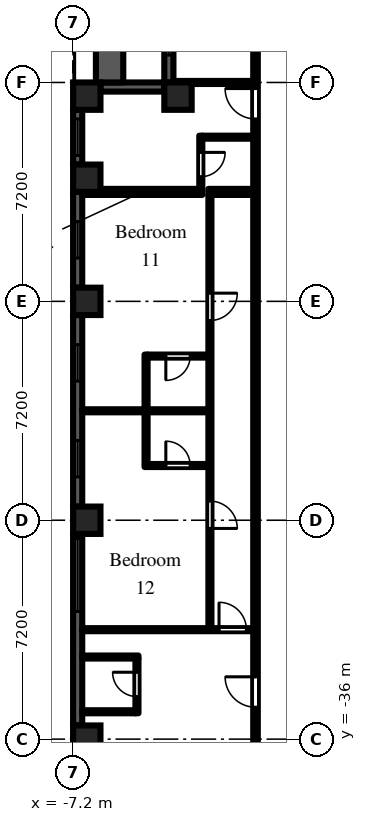
"""IFC4 building model, lengths in metres.
Left out: names, types, materials, properties, quantities, classifications, styles, units other than length and angle.
Written with IfcOpenShell. Run it as: python <this file> out.ifc"""

import sys

from ifc_helpers import new_model, si_unit, direction, frame, frame_2d, origin, origin_2d, place, context, subcontext, project, spatial, rectangle, extrude, element, fill, save


model = new_model("IFC4")
c1 = context("Model", 3, precision=1e-05, world=origin(), true_north=direction((0.0, 1.0)))
c2 = subcontext(c1, "Body", "Model", "MODEL_VIEW")
j1 = project(units=[si_unit("LENGTHUNIT", "METRE"), si_unit("PLANEANGLEUNIT", "RADIAN")], contexts=[c1])
p1 = place(None, origin())
s1 = spatial("IfcSite", under=j1, at=p1, CompositionType="ELEMENT")
p2 = place(p1, origin())
s2 = spatial("IfcBuilding", under=s1, at=p2, CompositionType="ELEMENT")
p3 = place(p2, frame((0.0, 0.0, 29.7)))
s3 = spatial("IfcBuildingStorey", under=s2, at=p3, CompositionType="ELEMENT", Elevation=29.7)
for number, where, z_axis, x_axis in (
    (1, (-6.75, -36.0, 0.0), (0.0, 0.0, 1.0), (1.0, 0.0, 0.0)),
    (2, (-6.75, -28.8, 0.0), (0.0, 0.0, 1.0), (1.0, 0.0, 0.0)),
    (3, (-6.75, -21.6, 0.0), (0.0, 0.0, 1.0), (1.0, 0.0, 0.0)),
    (4, (-6.75, -17.55, 0.0), (0.0, 0.0, 1.0), (1.0, 0.0, 0.0)),
    (5, (-6.75, -14.85, 0.0), (0.0, 0.0, 1.0), (1.0, 0.0, 0.0)),
    (6, (-3.75, -14.85, 0.0), (0.0, 0.0, 1.0), (1.0, 0.0, 0.0)),
):
    element("IfcColumn", number, at=place(p3, frame(where, z_axis=z_axis, x_axis=x_axis)), inside=s3, PredefinedType="COLUMN", context=c2, shape_type="SweptSolid", body=[
        extrude(rectangle(XDim=0.9, YDim=0.9, at=origin_2d()), origin(), (0.0, 0.0, 1.0), 3.0),
    ])
p4 = place(p3, frame((-4.05, -7.2, 0.0), z_axis=(0.0, 0.0, 1.0), x_axis=(0.0, -1.0, 0.0)))
e7 = element("IfcWall", 7, at=p4, inside=s3, PredefinedType="SOLIDWALL", context=c2, shape_type="SweptSolid", body=[
    extrude(rectangle(XDim=7.2, YDim=0.3, at=frame_2d((3.6, 0.0))), origin(), (0.0, 0.0, 1.0), 2.1),
])
p5 = place(p4, frame((3.0, 0.0, 0.0)))
e8 = element("IfcOpeningElement", 8, at=p5, cuts=e7, PredefinedType="OPENING", context=c2, shape_type="SweptSolid", body=[
    extrude(rectangle(XDim=1.2, YDim=2.05, at=frame_2d((0.6, 1.025))), frame((0.0, 0.16, 0.0), z_axis=(0.0, -1.0, 0.0), x_axis=(1.0, 0.0, 0.0)), (0.0, 0.0, 1.0), 0.32),
])
p6 = place(p4, frame((0.9, 0.0, 0.2)))
e9 = element("IfcOpeningElement", 9, at=p6, cuts=e7, PredefinedType="OPENING", context=c2, shape_type="SweptSolid", body=[
    extrude(rectangle(XDim=1.8, YDim=1.85, at=frame_2d((0.9, 0.925))), frame((0.0, 0.16, 0.0), z_axis=(0.0, -1.0, 0.0), x_axis=(1.0, 0.0, 0.0)), (0.0, 0.0, 1.0), 0.32),
])
p7 = place(p4, frame((4.5, 0.0, 0.2)))
e10 = element("IfcOpeningElement", 10, at=p7, cuts=e7, PredefinedType="OPENING", context=c2, shape_type="SweptSolid", body=[
    extrude(rectangle(XDim=1.8, YDim=1.85, at=frame_2d((0.9, 0.925))), frame((0.0, 0.16, 0.0), z_axis=(0.0, -1.0, 0.0), x_axis=(1.0, 0.0, 0.0)), (0.0, 0.0, 1.0), 0.32),
])
p8 = place(p3, frame((-4.2, -14.55, 0.0), z_axis=(0.0, 0.0, 1.0), x_axis=(-1.0, 0.0, 0.0)))
e11 = element("IfcWall", 11, at=p8, inside=s3, PredefinedType="SOLIDWALL", context=c2, shape_type="SweptSolid", body=[
    extrude(rectangle(XDim=2.1, YDim=0.3, at=frame_2d((1.05, 0.0))), origin(), (0.0, 0.0, 1.0), 2.1),
])
p9 = place(p3, frame((-7.05, -15.3, 0.0), z_axis=(0.0, 0.0, 1.0), x_axis=(0.0, -1.0, 0.0)))
e12 = element("IfcWall", 12, at=p9, inside=s3, PredefinedType="SOLIDWALL", context=c2, shape_type="SweptSolid", body=[
    extrude(rectangle(XDim=1.8, YDim=0.3, at=frame_2d((0.9, 0.0))), origin(), (0.0, 0.0, 1.0), 2.1),
])
p10 = place(p9, frame((0.3, 0.0, 0.2)))
e13 = element("IfcOpeningElement", 13, at=p10, cuts=e12, PredefinedType="OPENING", context=c2, shape_type="SweptSolid", body=[
    extrude(rectangle(XDim=1.2, YDim=1.85, at=frame_2d((0.6, 0.925))), frame((0.0, 0.16, 0.0), z_axis=(0.0, -1.0, 0.0), x_axis=(1.0, 0.0, 0.0)), (0.0, 0.0, 1.0), 0.32),
])
p11 = place(p3, frame((-7.05, -18.0, 0.0), z_axis=(0.0, 0.0, 1.0), x_axis=(0.0, -1.0, 0.0)))
e14 = element("IfcWall", 14, at=p11, inside=s3, PredefinedType="SOLIDWALL", context=c2, shape_type="SweptSolid", body=[
    extrude(rectangle(XDim=3.15, YDim=0.3, at=frame_2d((1.575, 0.0))), origin(), (0.0, 0.0, 1.0), 2.1),
])
p12 = place(p11, frame((0.975, 0.0, 0.2)))
e15 = element("IfcOpeningElement", 15, at=p12, cuts=e14, PredefinedType="OPENING", context=c2, shape_type="SweptSolid", body=[
    extrude(rectangle(XDim=1.2, YDim=1.85, at=frame_2d((0.6, 0.925))), frame((0.0, 0.16, 0.0), z_axis=(0.0, -1.0, 0.0), x_axis=(1.0, 0.0, 0.0)), (0.0, 0.0, 1.0), 0.32),
])
p13 = place(p3, frame((-7.05, -22.05, 0.0), z_axis=(0.0, 0.0, 1.0), x_axis=(0.0, -1.0, 0.0)))
e16 = element("IfcWall", 16, at=p13, inside=s3, PredefinedType="SOLIDWALL", context=c2, shape_type="SweptSolid", body=[
    extrude(rectangle(XDim=6.3, YDim=0.3, at=frame_2d((3.15, 0.0))), origin(), (0.0, 0.0, 1.0), 2.1),
])
p14 = place(p13, frame((0.975, 0.0, 0.2)))
e17 = element("IfcOpeningElement", 17, at=p14, cuts=e16, PredefinedType="OPENING", context=c2, shape_type="SweptSolid", body=[
    extrude(rectangle(XDim=1.2, YDim=1.85, at=frame_2d((0.6, 0.925))), frame((0.0, 0.16, 0.0), z_axis=(0.0, -1.0, 0.0), x_axis=(1.0, 0.0, 0.0)), (0.0, 0.0, 1.0), 0.32),
])
p15 = place(p13, frame((4.125, 0.0, 0.2)))
e18 = element("IfcOpeningElement", 18, at=p15, cuts=e16, PredefinedType="OPENING", context=c2, shape_type="SweptSolid", body=[
    extrude(rectangle(XDim=1.2, YDim=1.85, at=frame_2d((0.6, 0.925))), frame((0.0, 0.16, 0.0), z_axis=(0.0, -1.0, 0.0), x_axis=(1.0, 0.0, 0.0)), (0.0, 0.0, 1.0), 0.32),
])
p16 = place(p3, frame((-7.05, -29.25, 0.0), z_axis=(0.0, 0.0, 1.0), x_axis=(0.0, -1.0, 0.0)))
e19 = element("IfcWall", 19, at=p16, inside=s3, PredefinedType="SOLIDWALL", context=c2, shape_type="SweptSolid", body=[
    extrude(rectangle(XDim=6.3, YDim=0.3, at=frame_2d((3.15, 0.0))), origin(), (0.0, 0.0, 1.0), 2.1),
])
p17 = place(p16, frame((0.15, 0.0, 0.2)))
e20 = element("IfcOpeningElement", 20, at=p17, cuts=e19, PredefinedType="OPENING", context=c2, shape_type="SweptSolid", body=[
    extrude(rectangle(XDim=2.4, YDim=1.85, at=frame_2d((1.2, 0.925))), frame((0.0, 0.16, 0.0), z_axis=(0.0, -1.0, 0.0), x_axis=(1.0, 0.0, 0.0)), (0.0, 0.0, 1.0), 0.32),
])
p18 = place(p3, frame((-6.0, -14.4, 0.0), z_axis=(0.0, 0.0, 1.0), x_axis=(0.0, 1.0, 0.0)))
e21 = element("IfcWall", 21, at=p18, inside=s3, PredefinedType="PARAPET", context=c2, shape_type="SweptSolid", body=[
    extrude(rectangle(XDim=7.2, YDim=0.9, at=frame_2d((3.6, 0.0))), origin(), (0.0, 0.0, 1.0), 0.8),
])
p19 = place(p3, frame((-6.9, -35.1, 0.0), z_axis=(0.0, 0.0, 1.0), x_axis=(1.0, 0.0, 0.0)))
e22 = element("IfcWall", 22, at=p19, inside=s3, PredefinedType="PARTITIONING", context=c2, shape_type="SweptSolid", body=[
    extrude(rectangle(XDim=1.75, YDim=0.1, at=frame_2d((0.875, 0.0))), origin(), (0.0, 0.0, 1.0), 2.575),
])
p20 = place(p3, frame((-6.9, -33.3, 0.0), z_axis=(0.0, 0.0, 1.0), x_axis=(1.0, 0.0, 0.0)))
e23 = element("IfcWall", 23, at=p20, inside=s3, PredefinedType="PARTITIONING", context=c2, shape_type="SweptSolid", body=[
    extrude(rectangle(XDim=1.85, YDim=0.1, at=frame_2d((0.925, 0.0))), origin(), (0.0, 0.0, 1.0), 2.575),
])
p21 = place(p3, frame((-6.9, -32.4, 0.0), z_axis=(0.0, 0.0, 1.0), x_axis=(1.0, 0.0, 0.0)))
e24 = element("IfcWall", 24, at=p21, inside=s3, PredefinedType="PARTITIONING", context=c2, shape_type="SweptSolid", body=[
    extrude(rectangle(XDim=5.625, YDim=0.1, at=frame_2d((2.812, 0.0))), origin(), (0.0, 0.0, 1.0), 2.575),
])
p22 = place(p21, frame((4.5, 0.0, 0.0)))
e25 = element("IfcOpeningElement", 25, at=p22, cuts=e24, PredefinedType="OPENING", context=c2, shape_type="SweptSolid", body=[
    extrude(rectangle(XDim=0.9, YDim=2.1, at=frame_2d((0.45, 1.05))), frame((0.0, 0.06, 0.0), z_axis=(0.0, -1.0, 0.0), x_axis=(1.0, 0.0, 0.0)), (0.0, 0.0, 1.0), 0.12),
])
p23 = place(p3, frame((-6.9, -25.2, 0.0), z_axis=(0.0, 0.0, 1.0), x_axis=(1.0, 0.0, 0.0)))
e26 = element("IfcWall", 26, at=p23, inside=s3, PredefinedType="PARTITIONING", context=c2, shape_type="SweptSolid", body=[
    extrude(rectangle(XDim=4.15, YDim=0.1, at=frame_2d((2.075, 0.0))), origin(), (0.0, 0.0, 1.0), 2.575),
])
p24 = place(p3, frame((-6.9, -18.0, 0.0), z_axis=(0.0, 0.0, 1.0), x_axis=(1.0, 0.0, 0.0)))
e27 = element("IfcWall", 27, at=p24, inside=s3, PredefinedType="PARTITIONING", context=c2, shape_type="SweptSolid", body=[
    extrude(rectangle(XDim=3.95, YDim=0.2, at=frame_2d((1.975, 0.0))), origin(), (0.0, 0.0, 1.0), 2.575),
])
p25 = place(p3, frame((-5.1, -35.15, 0.0), z_axis=(0.0, 0.0, 1.0), x_axis=(0.0, 1.0, 0.0)))
e28 = element("IfcWall", 28, at=p25, inside=s3, PredefinedType="PARTITIONING", context=c2, shape_type="SweptSolid", body=[
    extrude(rectangle(XDim=1.8, YDim=0.1, at=frame_2d((0.9, 0.0))), origin(), (0.0, 0.0, 1.0), 2.575),
])
p26 = place(p25, frame((0.55, 0.0, 0.0)))
e29 = element("IfcOpeningElement", 29, at=p26, cuts=e28, PredefinedType="OPENING", context=c2, shape_type="SweptSolid", body=[
    extrude(rectangle(XDim=0.8, YDim=2.1, at=frame_2d((0.4, 1.05))), frame((0.0, 0.06, 0.0), z_axis=(0.0, -1.0, 0.0), x_axis=(1.0, 0.0, 0.0)), (0.0, 0.0, 1.0), 0.12),
])
p27 = place(p3, frame((-4.8, -27.05, 0.0), z_axis=(0.0, 0.0, 1.0), x_axis=(0.0, 1.0, 0.0)))
e30 = element("IfcWall", 30, at=p27, inside=s3, PredefinedType="PARTITIONING", context=c2, shape_type="SweptSolid", body=[
    extrude(rectangle(XDim=3.7, YDim=0.1, at=frame_2d((1.85, 0.0))), origin(), (0.0, 0.0, 1.0), 2.575),
])
p28 = place(p3, frame((-4.75, -27.0, 0.0), z_axis=(0.0, 0.0, 1.0), x_axis=(1.0, 0.0, 0.0)))
e31 = element("IfcWall", 31, at=p28, inside=s3, PredefinedType="PARTITIONING", context=c2, shape_type="SweptSolid", body=[
    extrude(rectangle(XDim=2.0, YDim=0.1, at=frame_2d((1.0, 0.0))), origin(), (0.0, 0.0, 1.0), 2.575),
])
p29 = place(p28, frame((0.6, 0.0, 0.0)))
e32 = element("IfcOpeningElement", 32, at=p29, cuts=e31, PredefinedType="OPENING", context=c2, shape_type="SweptSolid", body=[
    extrude(rectangle(XDim=0.8, YDim=2.1, at=frame_2d((0.4, 1.05))), frame((0.0, 0.06, 0.0), z_axis=(0.0, -1.0, 0.0), x_axis=(1.0, 0.0, 0.0)), (0.0, 0.0, 1.0), 0.12),
])
p30 = place(p3, frame((-4.75, -23.4, 0.0), z_axis=(0.0, 0.0, 1.0), x_axis=(1.0, 0.0, 0.0)))
e33 = element("IfcWall", 33, at=p30, inside=s3, PredefinedType="PARTITIONING", context=c2, shape_type="SweptSolid", body=[
    extrude(rectangle(XDim=2.0, YDim=0.1, at=frame_2d((1.0, 0.0))), origin(), (0.0, 0.0, 1.0), 2.575),
])
p31 = place(p30, frame((0.6, 0.0, 0.0)))
e34 = element("IfcOpeningElement", 34, at=p31, cuts=e33, PredefinedType="OPENING", context=c2, shape_type="SweptSolid", body=[
    extrude(rectangle(XDim=0.8, YDim=2.1, at=frame_2d((0.4, 1.05))), frame((0.0, 0.06, 0.0), z_axis=(0.0, -1.0, 0.0), x_axis=(1.0, 0.0, 0.0)), (0.0, 0.0, 1.0), 0.12),
])
p32 = place(p3, frame((-3.9, -14.4, 0.0), z_axis=(0.0, 0.0, 1.0), x_axis=(1.0, 0.0, 0.0)))
e35 = element("IfcWall", 35, at=p32, inside=s3, PredefinedType="PARTITIONING", context=c2, shape_type="SweptSolid", body=[
    extrude(rectangle(XDim=2.625, YDim=0.1, at=frame_2d((1.312, 0.0))), origin(), (0.0, 0.0, 1.0), 2.575),
])
p33 = place(p3, frame((-3.0, -17.9, 0.0), z_axis=(0.0, 0.0, 1.0), x_axis=(0.0, 1.0, 0.0)))
e36 = element("IfcWall", 36, at=p33, inside=s3, PredefinedType="PARTITIONING", context=c2, shape_type="SweptSolid", body=[
    extrude(rectangle(XDim=1.75, YDim=0.1, at=frame_2d((0.875, 0.0))), origin(), (0.0, 0.0, 1.0), 2.575),
])
p34 = place(p33, frame((0.4, 0.0, 0.0)))
e37 = element("IfcOpeningElement", 37, at=p34, cuts=e36, PredefinedType="OPENING", context=c2, shape_type="SweptSolid", body=[
    extrude(rectangle(XDim=0.8, YDim=2.1, at=frame_2d((0.4, 1.05))), frame((0.0, 0.06, 0.0), z_axis=(0.0, -1.0, 0.0), x_axis=(1.0, 0.0, 0.0)), (0.0, 0.0, 1.0), 0.12),
])
p35 = place(p3, frame((-2.95, -16.2, 0.0), z_axis=(0.0, 0.0, 1.0), x_axis=(1.0, 0.0, 0.0)))
e38 = element("IfcWall", 38, at=p35, inside=s3, PredefinedType="PARTITIONING", context=c2, shape_type="SweptSolid", body=[
    extrude(rectangle(XDim=1.675, YDim=0.1, at=frame_2d((0.837, 0.0))), origin(), (0.0, 0.0, 1.0), 2.575),
])
p36 = place(p3, frame((-2.7, -32.35, 0.0), z_axis=(0.0, 0.0, 1.0), x_axis=(0.0, 1.0, 0.0)))
e39 = element("IfcWall", 39, at=p36, inside=s3, PredefinedType="PARTITIONING", context=c2, shape_type="SweptSolid", body=[
    extrude(rectangle(XDim=14.25, YDim=0.1, at=frame_2d((7.125, 0.0))), origin(), (0.0, 0.0, 1.0), 2.575),
])
p37 = place(p36, frame((3.28, 0.0, 0.0)))
e40 = element("IfcOpeningElement", 40, at=p37, cuts=e39, PredefinedType="OPENING", context=c2, shape_type="SweptSolid", body=[
    extrude(rectangle(XDim=0.9, YDim=2.1, at=frame_2d((0.45, 1.05))), frame((0.0, 0.06, 0.0), z_axis=(0.0, -1.0, 0.0), x_axis=(1.0, 0.0, 0.0)), (0.0, 0.0, 1.0), 0.12),
])
p38 = place(p36, frame((10.12, 0.0, 0.0)))
e41 = element("IfcOpeningElement", 41, at=p38, cuts=e39, PredefinedType="OPENING", context=c2, shape_type="SweptSolid", body=[
    extrude(rectangle(XDim=0.9, YDim=2.1, at=frame_2d((0.45, 1.05))), frame((0.0, 0.06, 0.0), z_axis=(0.0, -1.0, 0.0), x_axis=(1.0, 0.0, 0.0)), (0.0, 0.0, 1.0), 0.12),
])
p39 = place(p3, frame((-2.75, -18.0, 0.0), z_axis=(0.0, 0.0, 1.0), x_axis=(1.0, 0.0, 0.0)))
e42 = element("IfcWall", 42, at=p39, inside=s3, PredefinedType="PARTITIONING", context=c2, shape_type="SweptSolid", body=[
    extrude(rectangle(XDim=1.475, YDim=0.2, at=frame_2d((0.738, 0.0))), origin(), (0.0, 0.0, 1.0), 2.575),
])
p40 = place(p3, frame((-1.2, -36.5, 0.0), z_axis=(0.0, 0.0, 1.0), x_axis=(0.0, 1.0, 0.0)))
e43 = element("IfcWall", 43, at=p40, inside=s3, PredefinedType="PARTITIONING", context=c2, shape_type="SweptSolid", body=[
    extrude(rectangle(XDim=35.375, YDim=0.15, at=frame_2d((17.688, 0.0))), origin(), (0.0, 0.0, 1.0), 2.575),
])
p41 = place(p40, frame((33.65, 0.0, 0.0)))
e44 = element("IfcOpeningElement", 44, at=p41, cuts=e43, PredefinedType="OPENING", context=c2, shape_type="SweptSolid", body=[
    extrude(rectangle(XDim=0.9, YDim=2.1, at=frame_2d((0.45, 1.05))), frame((0.0, 0.085, 0.0), z_axis=(0.0, -1.0, 0.0), x_axis=(1.0, 0.0, 0.0)), (0.0, 0.0, 1.0), 0.17),
])
p42 = place(p40, frame((30.65, 0.0, 0.0)))
e45 = element("IfcOpeningElement", 45, at=p42, cuts=e43, PredefinedType="OPENING", context=c2, shape_type="SweptSolid", body=[
    extrude(rectangle(XDim=0.9, YDim=2.1, at=frame_2d((0.45, 1.05))), frame((0.0, 0.085, 0.0), z_axis=(0.0, -1.0, 0.0), x_axis=(1.0, 0.0, 0.0)), (0.0, 0.0, 1.0), 0.17),
])
p43 = place(p40, frame((27.05, 0.0, 0.0)))
e46 = element("IfcOpeningElement", 46, at=p43, cuts=e43, PredefinedType="OPENING", context=c2, shape_type="SweptSolid", body=[
    extrude(rectangle(XDim=0.9, YDim=2.1, at=frame_2d((0.45, 1.05))), frame((0.0, 0.085, 0.0), z_axis=(0.0, -1.0, 0.0), x_axis=(1.0, 0.0, 0.0)), (0.0, 0.0, 1.0), 0.17),
])
p44 = place(p40, frame((20.9, 0.0, 0.0)))
e47 = element("IfcOpeningElement", 47, at=p44, cuts=e43, PredefinedType="OPENING", context=c2, shape_type="SweptSolid", body=[
    extrude(rectangle(XDim=1.0, YDim=2.1, at=frame_2d((0.5, 1.05))), frame((0.0, 0.085, 0.0), z_axis=(0.0, -1.0, 0.0), x_axis=(1.0, 0.0, 0.0)), (0.0, 0.0, 1.0), 0.17),
])
p45 = place(p40, frame((1.55, 0.0, 0.0)))
e48 = element("IfcOpeningElement", 48, at=p45, cuts=e43, PredefinedType="OPENING", context=c2, shape_type="SweptSolid", body=[
    extrude(rectangle(XDim=1.0, YDim=2.1, at=frame_2d((0.5, 1.05))), frame((0.0, 0.085, 0.0), z_axis=(0.0, -1.0, 0.0), x_axis=(1.0, 0.0, 0.0)), (0.0, 0.0, 1.0), 0.17),
])
p46 = place(p7, origin())
e49 = element("IfcWindow", 49, at=p46, inside=s3, PartitioningType="SINGLE_PANEL", PredefinedType="WINDOW", context=c2, shape_type="SweptSolid", body=[
    extrude(rectangle(XDim=1.8, YDim=1.85, at=frame_2d((0.9, 0.925))), frame((0.0, 0.03, 0.0), z_axis=(0.0, -1.0, 0.0), x_axis=(1.0, 0.0, 0.0)), (0.0, 0.0, 1.0), 0.06),
])
fill(e10, e49)
p47 = place(p10, origin())
e50 = element("IfcWindow", 50, at=p47, inside=s3, PartitioningType="SINGLE_PANEL", PredefinedType="WINDOW", context=c2, shape_type="SweptSolid", body=[
    extrude(rectangle(XDim=1.2, YDim=1.85, at=frame_2d((0.6, 0.925))), frame((0.0, 0.03, 0.0), z_axis=(0.0, -1.0, 0.0), x_axis=(1.0, 0.0, 0.0)), (0.0, 0.0, 1.0), 0.06),
])
fill(e13, e50)
p48 = place(p12, origin())
e51 = element("IfcWindow", 51, at=p48, inside=s3, PartitioningType="SINGLE_PANEL", PredefinedType="WINDOW", context=c2, shape_type="SweptSolid", body=[
    extrude(rectangle(XDim=1.2, YDim=1.85, at=frame_2d((0.6, 0.925))), frame((0.0, 0.03, 0.0), z_axis=(0.0, -1.0, 0.0), x_axis=(1.0, 0.0, 0.0)), (0.0, 0.0, 1.0), 0.06),
])
fill(e15, e51)
p49 = place(p14, origin())
e52 = element("IfcWindow", 52, at=p49, inside=s3, PartitioningType="SINGLE_PANEL", PredefinedType="WINDOW", context=c2, shape_type="SweptSolid", body=[
    extrude(rectangle(XDim=1.2, YDim=1.85, at=frame_2d((0.6, 0.925))), frame((0.0, 0.03, 0.0), z_axis=(0.0, -1.0, 0.0), x_axis=(1.0, 0.0, 0.0)), (0.0, 0.0, 1.0), 0.06),
])
fill(e17, e52)
p50 = place(p15, origin())
e53 = element("IfcWindow", 53, at=p50, inside=s3, PartitioningType="SINGLE_PANEL", PredefinedType="WINDOW", context=c2, shape_type="SweptSolid", body=[
    extrude(rectangle(XDim=1.2, YDim=1.85, at=frame_2d((0.6, 0.925))), frame((0.0, 0.03, 0.0), z_axis=(0.0, -1.0, 0.0), x_axis=(1.0, 0.0, 0.0)), (0.0, 0.0, 1.0), 0.06),
])
fill(e18, e53)
p51 = place(p17, origin())
e54 = element("IfcWindow", 54, at=p51, inside=s3, PartitioningType="SINGLE_PANEL", PredefinedType="WINDOW", context=c2, shape_type="SweptSolid", body=[
    extrude(rectangle(XDim=2.4, YDim=1.85, at=frame_2d((1.2, 0.925))), frame((0.0, 0.03, 0.0), z_axis=(0.0, -1.0, 0.0), x_axis=(1.0, 0.0, 0.0)), (0.0, 0.0, 1.0), 0.06),
])
fill(e20, e54)
p52 = place(p34, frame((0.8, 0.0, 0.0), z_axis=(0.0, 0.0, 1.0), x_axis=(-1.0, 0.0, 0.0)))
e55 = element("IfcDoor", 55, at=p52, inside=s3, OperationType="SINGLE_SWING_LEFT", PredefinedType="DOOR", context=c2, shape_type="SweptSolid", body=[
    extrude(rectangle(XDim=0.8, YDim=2.1, at=frame_2d((0.4, 1.05))), frame((0.0, 0.025, 0.0), z_axis=(0.0, -1.0, 0.0), x_axis=(1.0, 0.0, 0.0)), (0.0, 0.0, 1.0), 0.05),
])
fill(e37, e55)
p53 = place(p44, origin())
e56 = element("IfcDoor", 56, at=p53, inside=s3, OperationType="SINGLE_SWING_RIGHT", PredefinedType="DOOR", context=c2, shape_type="SweptSolid", body=[
    extrude(rectangle(XDim=1.0, YDim=2.1, at=frame_2d((0.5, 1.05))), frame((0.0, 0.025, 0.0), z_axis=(0.0, -1.0, 0.0), x_axis=(1.0, 0.0, 0.0)), (0.0, 0.0, 1.0), 0.05),
])
fill(e47, e56)
p54 = place(p26, origin())
e57 = element("IfcDoor", 57, at=p54, inside=s3, OperationType="SINGLE_SWING_RIGHT", PredefinedType="DOOR", context=c2, shape_type="SweptSolid", body=[
    extrude(rectangle(XDim=0.8, YDim=2.1, at=frame_2d((0.4, 1.05))), frame((0.0, 0.025, 0.0), z_axis=(0.0, -1.0, 0.0), x_axis=(1.0, 0.0, 0.0)), (0.0, 0.0, 1.0), 0.05),
])
fill(e29, e57)
p55 = place(p45, origin())
e58 = element("IfcDoor", 58, at=p55, inside=s3, OperationType="SINGLE_SWING_RIGHT", PredefinedType="DOOR", context=c2, shape_type="SweptSolid", body=[
    extrude(rectangle(XDim=1.0, YDim=2.1, at=frame_2d((0.5, 1.05))), frame((0.0, 0.025, 0.0), z_axis=(0.0, -1.0, 0.0), x_axis=(1.0, 0.0, 0.0)), (0.0, 0.0, 1.0), 0.05),
])
fill(e48, e58)
p56 = place(p37, frame((0.9, 0.0, 0.0), z_axis=(0.0, 0.0, 1.0), x_axis=(-1.0, 0.0, 0.0)))
e59 = element("IfcDoor", 59, at=p56, inside=s3, OperationType="SINGLE_SWING_RIGHT", PredefinedType="DOOR", context=c2, shape_type="SweptSolid", body=[
    extrude(rectangle(XDim=0.9, YDim=2.1, at=frame_2d((0.45, 1.05))), frame((0.0, 0.025, 0.0), z_axis=(0.0, -1.0, 0.0), x_axis=(1.0, 0.0, 0.0)), (0.0, 0.0, 1.0), 0.05),
])
fill(e40, e59)
p57 = place(p38, frame((0.9, 0.0, 0.0), z_axis=(0.0, 0.0, 1.0), x_axis=(-1.0, 0.0, 0.0)))
e60 = element("IfcDoor", 60, at=p57, inside=s3, OperationType="SINGLE_SWING_LEFT", PredefinedType="DOOR", context=c2, shape_type="SweptSolid", body=[
    extrude(rectangle(XDim=0.9, YDim=2.1, at=frame_2d((0.45, 1.05))), frame((0.0, 0.025, 0.0), z_axis=(0.0, -1.0, 0.0), x_axis=(1.0, 0.0, 0.0)), (0.0, 0.0, 1.0), 0.05),
])
fill(e41, e60)
p58 = place(p22, origin())
e61 = element("IfcDoor", 61, at=p58, inside=s3, OperationType="SINGLE_SWING_LEFT", PredefinedType="DOOR", context=c2, shape_type="SweptSolid", body=[
    extrude(rectangle(XDim=0.9, YDim=2.1, at=frame_2d((0.45, 1.05))), frame((0.0, 0.025, 0.0), z_axis=(0.0, -1.0, 0.0), x_axis=(1.0, 0.0, 0.0)), (0.0, 0.0, 1.0), 0.05),
])
fill(e25, e61)
p59 = place(p31, frame((0.8, 0.0, 0.0), z_axis=(0.0, 0.0, 1.0), x_axis=(-1.0, 0.0, 0.0)))
e62 = element("IfcDoor", 62, at=p59, inside=s3, OperationType="SINGLE_SWING_RIGHT", PredefinedType="DOOR", context=c2, shape_type="SweptSolid", body=[
    extrude(rectangle(XDim=0.8, YDim=2.1, at=frame_2d((0.4, 1.05))), frame((0.0, 0.025, 0.0), z_axis=(0.0, -1.0, 0.0), x_axis=(1.0, 0.0, 0.0)), (0.0, 0.0, 1.0), 0.05),
])
fill(e34, e62)
p60 = place(p29, origin())
e63 = element("IfcDoor", 63, at=p60, inside=s3, OperationType="SINGLE_SWING_LEFT", PredefinedType="DOOR", context=c2, shape_type="SweptSolid", body=[
    extrude(rectangle(XDim=0.8, YDim=2.1, at=frame_2d((0.4, 1.05))), frame((0.0, 0.025, 0.0), z_axis=(0.0, -1.0, 0.0), x_axis=(1.0, 0.0, 0.0)), (0.0, 0.0, 1.0), 0.05),
])
fill(e32, e63)
save(model, sys.argv[1])
